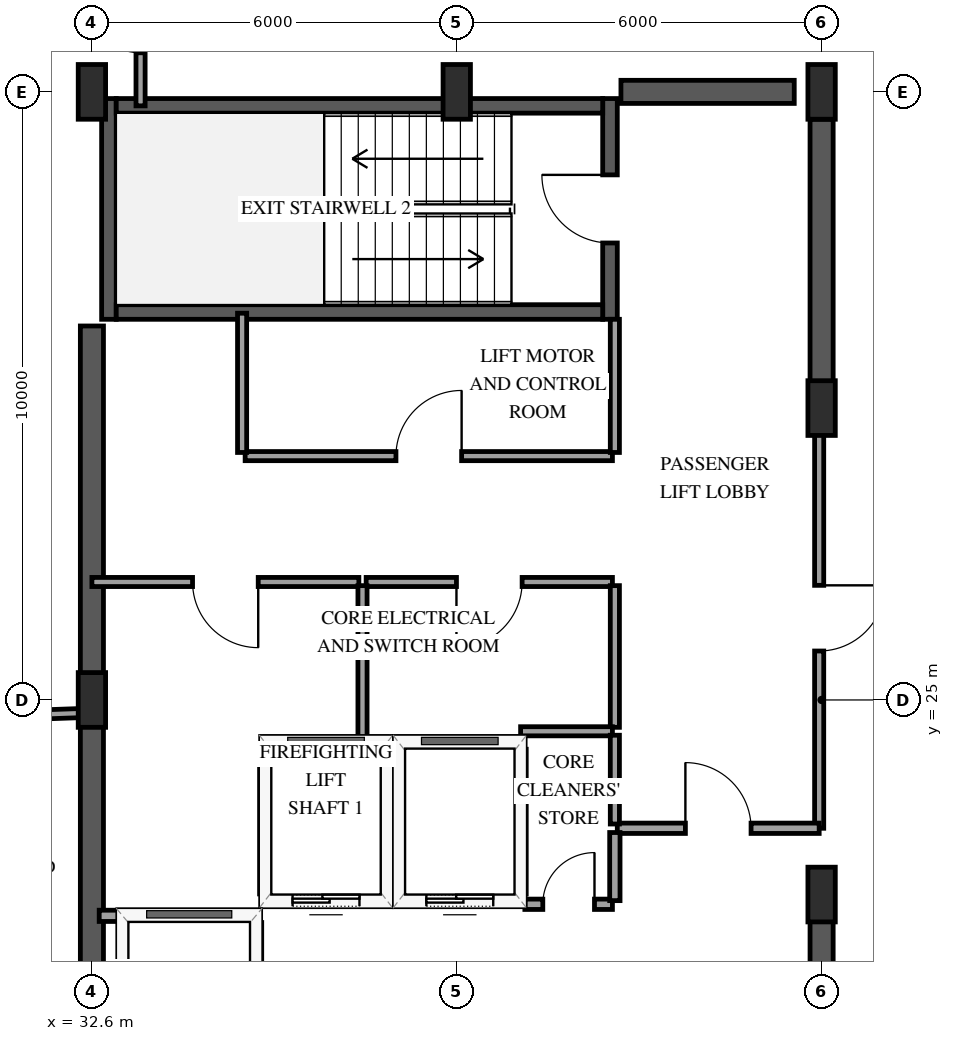
"""IFC4 building model, lengths in metres.
Left out: names, types, materials, properties, quantities, classifications, styles, units other than length and angle.
Written with IfcOpenShell. Run it as: python <this file> out.ifc"""

import sys

from ifc_helpers import new_model, si_unit, direction, frame, frame_2d, origin, origin_2d, place, context, subcontext, project, spatial, rectangle, extrude, element, fill, save


model = new_model("IFC4")
c1 = context("Model", 3, precision=1e-05, world=origin(), true_north=direction((0.0, 1.0)))
c2 = subcontext(c1, "Body", "Model", "MODEL_VIEW")
j1 = project(units=[si_unit("LENGTHUNIT", "METRE"), si_unit("PLANEANGLEUNIT", "RADIAN")], contexts=[c1])
p1 = place(None, origin())
s1 = spatial("IfcSite", under=j1, at=p1, CompositionType="ELEMENT")
p2 = place(p1, origin())
s2 = spatial("IfcBuilding", under=s1, at=p2, CompositionType="ELEMENT")
p3 = place(p2, frame((0.0, 0.0, 314.05)))
s3 = spatial("IfcBuildingStorey", under=s2, at=p3, CompositionType="ELEMENT", Elevation=314.05)
p4 = place(p3, frame((32.88, 31.26, 0.0), z_axis=(0.0, 0.0, 1.0), x_axis=(0.0, 1.0, 0.0)))
e1 = element("IfcWall", 1, at=p4, inside=s3, PredefinedType="SHEAR", context=c2, shape_type="SweptSolid", body=[
    extrude(rectangle(XDim=3.63, YDim=0.24, at=frame_2d((1.815, 0.0))), origin(), (0.0, 0.0, 1.0), 4.2),
])
p5 = place(p3, frame((41.12, 31.26, 0.0), z_axis=(0.0, 0.0, 1.0), x_axis=(0.0, 1.0, 0.0)))
e2 = element("IfcWall", 2, at=p5, inside=s3, PredefinedType="SHEAR", context=c2, shape_type="SweptSolid", body=[
    extrude(rectangle(XDim=3.63, YDim=0.24, at=frame_2d((1.815, 0.0))), origin(), (0.0, 0.0, 1.0), 4.2),
])
p6 = place(p5, frame((1.255, 0.0, 0.0)))
e3 = element("IfcOpeningElement", 3, at=p6, cuts=e2, PredefinedType="OPENING", context=c2, shape_type="SweptSolid", body=[
    extrude(rectangle(XDim=1.12, YDim=2.15, at=frame_2d((0.56, 1.075))), frame((0.0, 0.13, 0.0), z_axis=(0.0, -1.0, 0.0), x_axis=(1.0, 0.0, 0.0)), (0.0, 0.0, 1.0), 0.26),
])
for number, where, z_axis, x_axis in (
    (4, (33.0, 31.38, 0.0), (0.0, 0.0, 1.0), (1.0, 0.0, 0.0)),
    (5, (33.0, 34.77, 0.0), (0.0, 0.0, 1.0), (1.0, 0.0, 0.0)),
):
    element("IfcWall", number, at=place(p3, frame(where, z_axis=z_axis, x_axis=x_axis)), inside=s3, PredefinedType="SHEAR", context=c2, shape_type="SweptSolid", body=[
        extrude(rectangle(XDim=8.0, YDim=0.24, at=frame_2d((4.0, 0.0))), origin(), (0.0, 0.0, 1.0), 4.2),
    ])
p7 = place(p3, frame((32.6, 18.85, 0.0), z_axis=(0.0, 0.0, 1.0), x_axis=(0.0, 1.0, 0.0)))
e6 = element("IfcWall", 6, at=p7, inside=s3, PredefinedType="SHEAR", context=c2, shape_type="SweptSolid", body=[
    extrude(rectangle(XDim=12.3, YDim=0.38, at=frame_2d((6.15, 0.0))), origin(), (0.0, 0.0, 1.0), 4.2),
])
p8 = place(p3, frame((41.3, 35.0, 0.0), z_axis=(0.0, 0.0, 1.0), x_axis=(1.0, 0.0, 0.0)))
e7 = element("IfcWall", 7, at=p8, inside=s3, PredefinedType="SHEAR", context=c2, shape_type="SweptSolid", body=[
    extrude(rectangle(XDim=2.85, YDim=0.38, at=frame_2d((1.425, 0.0))), origin(), (0.0, 0.0, 1.0), 4.2),
])
p9 = place(p3, frame((44.6, 15.45, 0.0), z_axis=(0.0, 0.0, 1.0), x_axis=(0.0, 1.0, 0.0)))
e8 = element("IfcWall", 8, at=p9, inside=s3, PredefinedType="SHEAR", context=c2, shape_type="SweptSolid", body=[
    extrude(rectangle(XDim=6.35, YDim=0.38, at=frame_2d((3.175, 0.0))), origin(), (0.0, 0.0, 1.0), 4.2),
])
p10 = place(p3, frame((44.6, 29.8, 0.0), z_axis=(0.0, 0.0, 1.0), x_axis=(0.0, 1.0, 0.0)))
e9 = element("IfcWall", 9, at=p10, inside=s3, PredefinedType="SHEAR", context=c2, shape_type="SweptSolid", body=[
    extrude(rectangle(XDim=4.75, YDim=0.38, at=frame_2d((2.375, 0.0))), origin(), (0.0, 0.0, 1.0), 4.2),
])
for number, where, z_axis, x_axis in (
    (10, (32.6, 25.0, 0.0), (0.0, 0.0, 1.0), (1.0, 0.0, 0.0)),
    (11, (32.6, 35.0, 0.0), (0.0, 0.0, 1.0), (1.0, 0.0, 0.0)),
    (12, (38.6, 35.0, 0.0), (0.0, 0.0, 1.0), (1.0, 0.0, 0.0)),
    (13, (44.6, 21.8, 0.0), (0.0, 0.0, 1.0), (1.0, 0.0, 0.0)),
    (14, (44.6, 29.8, 0.0), (0.0, 0.0, 1.0), (1.0, 0.0, 0.0)),
    (15, (44.6, 35.0, 0.0), (0.0, 0.0, 1.0), (1.0, 0.0, 0.0)),
):
    element("IfcColumn", number, at=place(p3, frame(where, z_axis=z_axis, x_axis=x_axis)), inside=s3, PredefinedType="PILASTER", context=c2, shape_type="SweptSolid", body=[
        extrude(rectangle(XDim=0.45, YDim=0.9, at=origin_2d()), origin(), (0.0, 0.0, 1.0), 4.2),
    ])
p11 = place(p3, frame((34.757, 38.339, 0.0), z_axis=(0.0, 0.0, 1.0), x_axis=(-0.771839914266, -0.635816912913, 0.0)))
e16 = element("IfcWall", 16, at=p11, inside=s3, PredefinedType="SOLIDWALL", context=c2, shape_type="SweptSolid", body=[
    extrude(rectangle(XDim=6.399, YDim=0.27, at=frame_2d((3.199, 0.0))), origin(), (0.0, 0.0, 1.0), 3.195),
])
p12 = place(p3, frame((35.45, 21.7, 0.0), z_axis=(0.0, 0.0, 1.0), x_axis=(1.0, 0.0, 0.0)))
e17 = element("IfcWall", 17, at=p12, inside=s3, PredefinedType="SOLIDWALL", context=c2, shape_type="SweptSolid", body=[
    extrude(rectangle(XDim=2.0, YDim=0.185, at=frame_2d((1.0, 0.0))), origin(), (0.0, 0.0, 1.0), 3.895),
])
p13 = place(p12, frame((0.45, 0.0, 0.0)))
e18 = element("IfcOpeningElement", 18, at=p13, cuts=e17, PredefinedType="OPENING", context=c2, shape_type="SweptSolid", body=[
    extrude(rectangle(XDim=1.1, YDim=2.15, at=frame_2d((0.55, 1.075))), frame((0.0, 0.103, 0.0), z_axis=(0.0, -1.0, 0.0), x_axis=(1.0, 0.0, 0.0)), (0.0, 0.0, 1.0), 0.205),
])
p14 = place(p3, frame((35.45, 24.3, 0.0), z_axis=(0.0, 0.0, 1.0), x_axis=(1.0, 0.0, 0.0)))
e19 = element("IfcWall", 19, at=p14, inside=s3, PredefinedType="SOLIDWALL", context=c2, shape_type="SweptSolid", body=[
    extrude(rectangle(XDim=2.0, YDim=0.185, at=frame_2d((1.0, 0.0))), origin(), (0.0, 0.0, 1.0), 3.895),
])
for number, where, z_axis, x_axis in (
    (20, (35.45, 21.81, 0.0), (0.0, 0.0, 1.0), (0.0, 1.0, 0.0)),
    (21, (37.45, 21.81, 0.0), (0.0, 0.0, 1.0), (0.0, 1.0, 0.0)),
):
    element("IfcWall", number, at=place(p3, frame(where, z_axis=z_axis, x_axis=x_axis)), inside=s3, PredefinedType="SOLIDWALL", context=c2, shape_type="SweptSolid", body=[
        extrude(rectangle(XDim=2.38, YDim=0.185, at=frame_2d((1.19, 0.0))), origin(), (0.0, 0.0, 1.0), 3.895),
    ])
p15 = place(p3, frame((37.65, 21.7, 0.0), z_axis=(0.0, 0.0, 1.0), x_axis=(1.0, 0.0, 0.0)))
e22 = element("IfcWall", 22, at=p15, inside=s3, PredefinedType="SOLIDWALL", context=c2, shape_type="SweptSolid", body=[
    extrude(rectangle(XDim=2.0, YDim=0.185, at=frame_2d((1.0, 0.0))), origin(), (0.0, 0.0, 1.0), 3.895),
])
p16 = place(p15, frame((0.45, 0.0, 0.0)))
e23 = element("IfcOpeningElement", 23, at=p16, cuts=e22, PredefinedType="OPENING", context=c2, shape_type="SweptSolid", body=[
    extrude(rectangle(XDim=1.1, YDim=2.15, at=frame_2d((0.55, 1.075))), frame((0.0, 0.103, 0.0), z_axis=(0.0, -1.0, 0.0), x_axis=(1.0, 0.0, 0.0)), (0.0, 0.0, 1.0), 0.205),
])
p17 = place(p3, frame((37.65, 24.3, 0.0), z_axis=(0.0, 0.0, 1.0), x_axis=(1.0, 0.0, 0.0)))
e24 = element("IfcWall", 24, at=p17, inside=s3, PredefinedType="SOLIDWALL", context=c2, shape_type="SweptSolid", body=[
    extrude(rectangle(XDim=2.0, YDim=0.185, at=frame_2d((1.0, 0.0))), origin(), (0.0, 0.0, 1.0), 3.895),
])
p18 = place(p3, frame((39.65, 21.81, 0.0), z_axis=(0.0, 0.0, 1.0), x_axis=(0.0, 1.0, 0.0)))
e25 = element("IfcWall", 25, at=p18, inside=s3, PredefinedType="SOLIDWALL", context=c2, shape_type="SweptSolid", body=[
    extrude(rectangle(XDim=2.38, YDim=0.185, at=frame_2d((1.19, 0.0))), origin(), (0.0, 0.0, 1.0), 3.895),
])
p19 = place(p3, frame((32.72, 21.45, 0.0), z_axis=(0.0, 0.0, 1.0), x_axis=(1.0, 0.0, 0.0)))
e26 = element("IfcWall", 26, at=p19, inside=s3, PredefinedType="SOLIDWALL", context=c2, shape_type="SweptSolid", body=[
    extrude(rectangle(XDim=2.58, YDim=0.185, at=frame_2d((1.29, 0.0))), origin(), (0.0, 0.0, 1.0), 3.895),
])
p20 = place(p3, frame((35.3, 18.79, 0.0), z_axis=(0.0, 0.0, 1.0), x_axis=(0.0, 1.0, 0.0)))
e27 = element("IfcWall", 27, at=p20, inside=s3, PredefinedType="SOLIDWALL", context=c2, shape_type="SweptSolid", body=[
    extrude(rectangle(XDim=2.55, YDim=0.185, at=frame_2d((1.275, 0.0))), origin(), (0.0, 0.0, 1.0), 3.895),
])
p21 = place(p20, frame((0.725, 0.0, 0.0)))
e28 = element("IfcOpeningElement", 28, at=p21, cuts=e27, PredefinedType="OPENING", context=c2, shape_type="SweptSolid", body=[
    extrude(rectangle(XDim=1.1, YDim=2.15, at=frame_2d((0.55, 1.075))), frame((0.0, 0.103, 0.0), z_axis=(0.0, -1.0, 0.0), x_axis=(1.0, 0.0, 0.0)), (0.0, 0.0, 1.0), 0.205),
])
p22 = place(p3, frame((44.56, 29.8, 0.0), z_axis=(0.0, 0.0, 1.0), x_axis=(0.0, -1.0, 0.0)))
e29 = element("IfcWall", 29, at=p22, inside=s3, PredefinedType="PARTITIONING", context=c2, shape_type="SweptSolid", body=[
    extrude(rectangle(XDim=6.91, YDim=0.15, at=frame_2d((3.455, 0.0))), origin(), (0.0, 0.0, 1.0), 2.935),
])
p23 = place(p22, frame((2.915, 0.0, 0.0)))
e30 = element("IfcOpeningElement", 30, at=p23, cuts=e29, PredefinedType="OPENING", context=c2, shape_type="SweptSolid", body=[
    extrude(rectangle(XDim=1.08, YDim=2.15, at=frame_2d((0.54, 1.075))), frame((0.0, 0.085, 0.0), z_axis=(0.0, -1.0, 0.0), x_axis=(1.0, 0.0, 0.0)), (0.0, 0.0, 1.0), 0.17),
])
p24 = place(p3, frame((35.12, 29.01, 0.0), z_axis=(0.0, 0.0, 1.0), x_axis=(1.0, 0.0, 0.0)))
e31 = element("IfcWall", 31, at=p24, inside=s3, PredefinedType="PARTITIONING", context=c2, shape_type="SweptSolid", body=[
    extrude(rectangle(XDim=6.04, YDim=0.15, at=frame_2d((3.02, 0.0))), origin(), (0.0, 0.0, 1.0), 3.895),
])
p25 = place(p24, frame((2.48, 0.0, 0.0)))
e32 = element("IfcOpeningElement", 32, at=p25, cuts=e31, PredefinedType="OPENING", context=c2, shape_type="SweptSolid", body=[
    extrude(rectangle(XDim=1.08, YDim=2.15, at=frame_2d((0.54, 1.075))), frame((0.0, 0.085, 0.0), z_axis=(0.0, -1.0, 0.0), x_axis=(1.0, 0.0, 0.0)), (0.0, 0.0, 1.0), 0.17),
])
p26 = place(p3, frame((32.527, 24.788, 0.0), z_axis=(0.0, 0.0, 1.0), x_axis=(-0.999387714074, -0.034988526077, 0.0)))
e33 = element("IfcWall", 33, at=p26, inside=s3, PredefinedType="PARTITIONING", context=c2, shape_type="SweptSolid", body=[
    extrude(rectangle(XDim=6.008, YDim=0.15, at=frame_2d((3.004, 0.0))), origin(), (0.0, 0.0, 1.0), 3.19),
])
p27 = place(p3, frame((36.99, 26.94, 0.0), z_axis=(0.0, 0.0, 1.0), x_axis=(-1.0, 0.0, 0.0)))
e34 = element("IfcWall", 34, at=p27, inside=s3, PredefinedType="PARTITIONING", context=c2, shape_type="SweptSolid", body=[
    extrude(rectangle(XDim=4.39, YDim=0.15, at=frame_2d((2.195, 0.0))), origin(), (0.0, 0.0, 1.0), 3.895),
])
p28 = place(p27, frame((1.655, 0.0, 0.0)))
e35 = element("IfcOpeningElement", 35, at=p28, cuts=e34, PredefinedType="OPENING", context=c2, shape_type="SweptSolid", body=[
    extrude(rectangle(XDim=1.08, YDim=2.15, at=frame_2d((0.54, 1.075))), frame((0.0, 0.085, 0.0), z_axis=(0.0, -1.0, 0.0), x_axis=(1.0, 0.0, 0.0)), (0.0, 0.0, 1.0), 0.17),
])
p29 = place(p3, frame((41.16, 26.94, 0.0), z_axis=(0.0, 0.0, 1.0), x_axis=(-1.0, 0.0, 0.0)))
e36 = element("IfcWall", 36, at=p29, inside=s3, PredefinedType="PARTITIONING", context=c2, shape_type="SweptSolid", body=[
    extrude(rectangle(XDim=4.05, YDim=0.15, at=frame_2d((2.025, 0.0))), origin(), (0.0, 0.0, 1.0), 3.895),
])
p30 = place(p29, frame((1.485, 0.0, 0.0)))
e37 = element("IfcOpeningElement", 37, at=p30, cuts=e36, PredefinedType="OPENING", context=c2, shape_type="SweptSolid", body=[
    extrude(rectangle(XDim=1.08, YDim=2.15, at=frame_2d((0.54, 1.075))), frame((0.0, 0.085, 0.0), z_axis=(0.0, -1.0, 0.0), x_axis=(1.0, 0.0, 0.0)), (0.0, 0.0, 1.0), 0.17),
])
p31 = place(p3, frame((41.24, 22.89, 0.0), z_axis=(0.0, 0.0, 1.0), x_axis=(1.0, 0.0, 0.0)))
e38 = element("IfcWall", 38, at=p31, inside=s3, PredefinedType="PARTITIONING", context=c2, shape_type="SweptSolid", body=[
    extrude(rectangle(XDim=3.32, YDim=0.17, at=frame_2d((1.66, 0.0))), origin(), (0.0, 0.0, 1.0), 3.895),
])
p32 = place(p31, frame((1.12, 0.0, 0.0)))
e39 = element("IfcOpeningElement", 39, at=p32, cuts=e38, PredefinedType="OPENING", context=c2, shape_type="SweptSolid", body=[
    extrude(rectangle(XDim=1.08, YDim=2.15, at=frame_2d((0.54, 1.075))), frame((0.0, 0.095, 0.0), z_axis=(0.0, -1.0, 0.0), x_axis=(1.0, 0.0, 0.0)), (0.0, 0.0, 1.0), 0.19),
])
p33 = place(p3, frame((37.05, 26.88, 0.0), z_axis=(0.0, 0.0, 1.0), x_axis=(0.0, -1.0, 0.0)))
e40 = element("IfcWall", 40, at=p33, inside=s3, PredefinedType="PARTITIONING", context=c2, shape_type="SweptSolid", body=[
    extrude(rectangle(XDim=2.58, YDim=0.15, at=frame_2d((1.29, 0.0))), origin(), (0.0, 0.0, 1.0), 3.895),
])
p34 = place(p3, frame((33.4, 34.77, 0.0), z_axis=(0.0, 0.0, 1.0), x_axis=(0.0, 1.0, 0.0)))
e41 = element("IfcWall", 41, at=p34, inside=s3, PredefinedType="PARTITIONING", context=c2, shape_type="SweptSolid", body=[
    extrude(rectangle(XDim=2.451, YDim=0.15, at=frame_2d((1.226, 0.0))), origin(), (0.0, 0.0, 1.0), 3.895),
])
p35 = place(p34, frame((0.873, 0.0, 0.0)))
e42 = element("IfcOpeningElement", 42, at=p35, cuts=e41, PredefinedType="OPENING", context=c2, shape_type="SweptSolid", body=[
    extrude(rectangle(XDim=0.92, YDim=2.12, at=frame_2d((0.46, 1.06))), frame((0.0, 0.085, 0.0), z_axis=(0.0, -1.0, 0.0), x_axis=(1.0, 0.0, 0.0)), (0.0, 0.0, 1.0), 0.17),
])
p36 = place(p3, frame((41.2, 24.55, 0.0), z_axis=(0.0, 0.0, 1.0), x_axis=(0.0, 1.0, 0.0)))
e43 = element("IfcWall", 43, at=p36, inside=s3, PredefinedType="PARTITIONING", context=c2, shape_type="SweptSolid", body=[
    extrude(rectangle(XDim=2.33, YDim=0.15, at=frame_2d((1.165, 0.0))), origin(), (0.0, 0.0, 1.0), 3.895),
])
p37 = place(p3, frame((35.07, 31.36, 0.0), z_axis=(0.0, 0.0, 1.0), x_axis=(0.0, -1.0, 0.0)))
e44 = element("IfcWall", 44, at=p37, inside=s3, PredefinedType="PARTITIONING", context=c2, shape_type="SweptSolid", body=[
    extrude(rectangle(XDim=2.29, YDim=0.15, at=frame_2d((1.145, 0.0))), origin(), (0.0, 0.0, 1.0), 3.895),
])
p38 = place(p3, frame((41.2, 29.07, 0.0), z_axis=(0.0, 0.0, 1.0), x_axis=(0.0, 1.0, 0.0)))
e45 = element("IfcWall", 45, at=p38, inside=s3, PredefinedType="PARTITIONING", context=c2, shape_type="SweptSolid", body=[
    extrude(rectangle(XDim=2.19, YDim=0.15, at=frame_2d((1.095, 0.0))), origin(), (0.0, 0.0, 1.0), 3.895),
])
p39 = place(p3, frame((39.65, 24.485, 0.0), z_axis=(0.0, 0.0, 1.0), x_axis=(1.0, 0.0, 0.0)))
e46 = element("IfcWall", 46, at=p39, inside=s3, PredefinedType="PARTITIONING", context=c2, shape_type="SweptSolid", body=[
    extrude(rectangle(XDim=1.51, YDim=0.15, at=frame_2d((0.755, 0.0))), origin(), (0.0, 0.0, 1.0), 3.895),
])
p40 = place(p3, frame((41.2, 22.96, 0.0), z_axis=(0.0, 0.0, 1.0), x_axis=(0.0, 1.0, 0.0)))
e47 = element("IfcWall", 47, at=p40, inside=s3, PredefinedType="PARTITIONING", context=c2, shape_type="SweptSolid", body=[
    extrude(rectangle(XDim=1.46, YDim=0.15, at=frame_2d((0.73, 0.0))), origin(), (0.0, 0.0, 1.0), 3.895),
])
p41 = place(p3, frame((39.72, 21.64, 0.0), z_axis=(0.0, 0.0, 1.0), x_axis=(1.0, 0.0, 0.0)))
e48 = element("IfcWall", 48, at=p41, inside=s3, PredefinedType="PARTITIONING", context=c2, shape_type="SweptSolid", body=[
    extrude(rectangle(XDim=1.44, YDim=0.17, at=frame_2d((0.72, 0.0))), origin(), (0.0, 0.0, 1.0), 3.895),
])
p42 = place(p41, frame((0.295, 0.0, 0.0)))
e49 = element("IfcOpeningElement", 49, at=p42, cuts=e48, PredefinedType="OPENING", context=c2, shape_type="SweptSolid", body=[
    extrude(rectangle(XDim=0.85, YDim=2.1, at=frame_2d((0.425, 1.05))), frame((0.0, 0.095, 0.0), z_axis=(0.0, -1.0, 0.0), x_axis=(1.0, 0.0, 0.0)), (0.0, 0.0, 1.0), 0.19),
])
p43 = place(p3, frame((41.2, 21.7, 0.0), z_axis=(0.0, 0.0, 1.0), x_axis=(0.0, 1.0, 0.0)))
e50 = element("IfcWall", 50, at=p43, inside=s3, PredefinedType="PARTITIONING", context=c2, shape_type="SweptSolid", body=[
    extrude(rectangle(XDim=1.12, YDim=0.17, at=frame_2d((0.56, 0.0))), origin(), (0.0, 0.0, 1.0), 3.895),
])
p44 = place(p13, origin())
e51 = element("IfcDoor", 51, at=p44, inside=s3, OperationType="SLIDING_TO_LEFT", PredefinedType="DOOR", context=c2, shape_type="SweptSolid", body=[
    extrude(rectangle(XDim=1.1, YDim=2.15, at=frame_2d((0.55, 1.075))), frame((0.0, 0.025, 0.0), z_axis=(0.0, -1.0, 0.0), x_axis=(1.0, 0.0, 0.0)), (0.0, 0.0, 1.0), 0.05),
])
fill(e18, e51)
p45 = place(p16, origin())
e52 = element("IfcDoor", 52, at=p45, inside=s3, OperationType="SLIDING_TO_LEFT", PredefinedType="DOOR", context=c2, shape_type="SweptSolid", body=[
    extrude(rectangle(XDim=1.1, YDim=2.15, at=frame_2d((0.55, 1.075))), frame((0.0, 0.025, 0.0), z_axis=(0.0, -1.0, 0.0), x_axis=(1.0, 0.0, 0.0)), (0.0, 0.0, 1.0), 0.05),
])
fill(e23, e52)
p46 = place(p6, origin())
e53 = element("IfcDoor", 53, at=p46, inside=s3, OperationType="SINGLE_SWING_RIGHT", PredefinedType="DOOR", context=c2, shape_type="SweptSolid", body=[
    extrude(rectangle(XDim=1.12, YDim=2.15, at=frame_2d((0.56, 1.075))), frame((0.0, 0.025, 0.0), z_axis=(0.0, -1.0, 0.0), x_axis=(1.0, 0.0, 0.0)), (0.0, 0.0, 1.0), 0.05),
])
fill(e3, e53)
p47 = place(p23, origin())
e54 = element("IfcDoor", 54, at=p47, inside=s3, OperationType="SINGLE_SWING_LEFT", PredefinedType="DOOR", context=c2, shape_type="SweptSolid", body=[
    extrude(rectangle(XDim=1.08, YDim=2.15, at=frame_2d((0.54, 1.075))), frame((0.0, 0.025, 0.0), z_axis=(0.0, -1.0, 0.0), x_axis=(1.0, 0.0, 0.0)), (0.0, 0.0, 1.0), 0.05),
])
fill(e30, e54)
p48 = place(p25, origin())
e55 = element("IfcDoor", 55, at=p48, inside=s3, OperationType="SINGLE_SWING_RIGHT", PredefinedType="DOOR", context=c2, shape_type="SweptSolid", body=[
    extrude(rectangle(XDim=1.08, YDim=2.15, at=frame_2d((0.54, 1.075))), frame((0.0, 0.025, 0.0), z_axis=(0.0, -1.0, 0.0), x_axis=(1.0, 0.0, 0.0)), (0.0, 0.0, 1.0), 0.05),
])
fill(e32, e55)
p49 = place(p28, origin())
e56 = element("IfcDoor", 56, at=p49, inside=s3, OperationType="SINGLE_SWING_LEFT", PredefinedType="DOOR", context=c2, shape_type="SweptSolid", body=[
    extrude(rectangle(XDim=1.08, YDim=2.15, at=frame_2d((0.54, 1.075))), frame((0.0, 0.025, 0.0), z_axis=(0.0, -1.0, 0.0), x_axis=(1.0, 0.0, 0.0)), (0.0, 0.0, 1.0), 0.05),
])
fill(e35, e56)
p50 = place(p30, origin())
e57 = element("IfcDoor", 57, at=p50, inside=s3, OperationType="SINGLE_SWING_RIGHT", PredefinedType="DOOR", context=c2, shape_type="SweptSolid", body=[
    extrude(rectangle(XDim=1.08, YDim=2.15, at=frame_2d((0.54, 1.075))), frame((0.0, 0.025, 0.0), z_axis=(0.0, -1.0, 0.0), x_axis=(1.0, 0.0, 0.0)), (0.0, 0.0, 1.0), 0.05),
])
fill(e37, e57)
p51 = place(p32, origin())
e58 = element("IfcDoor", 58, at=p51, inside=s3, OperationType="SINGLE_SWING_LEFT", PredefinedType="DOOR", context=c2, shape_type="SweptSolid", body=[
    extrude(rectangle(XDim=1.08, YDim=2.15, at=frame_2d((0.54, 1.075))), frame((0.0, 0.025, 0.0), z_axis=(0.0, -1.0, 0.0), x_axis=(1.0, 0.0, 0.0)), (0.0, 0.0, 1.0), 0.05),
])
fill(e39, e58)
p52 = place(p35, origin())
e59 = element("IfcDoor", 59, at=p52, inside=s3, OperationType="SINGLE_SWING_RIGHT", PredefinedType="DOOR", context=c2, shape_type="SweptSolid", body=[
    extrude(rectangle(XDim=0.92, YDim=2.12, at=frame_2d((0.46, 1.06))), frame((0.0, 0.025, 0.0), z_axis=(0.0, -1.0, 0.0), x_axis=(1.0, 0.0, 0.0)), (0.0, 0.0, 1.0), 0.05),
])
fill(e42, e59)
p53 = place(p42, origin())
e60 = element("IfcDoor", 60, at=p53, inside=s3, OperationType="SINGLE_SWING_RIGHT", PredefinedType="DOOR", context=c2, shape_type="SweptSolid", body=[
    extrude(rectangle(XDim=0.85, YDim=2.1, at=frame_2d((0.425, 1.05))), frame((0.0, 0.025, 0.0), z_axis=(0.0, -1.0, 0.0), x_axis=(1.0, 0.0, 0.0)), (0.0, 0.0, 1.0), 0.05),
])
fill(e49, e60)
save(model, sys.argv[1])
